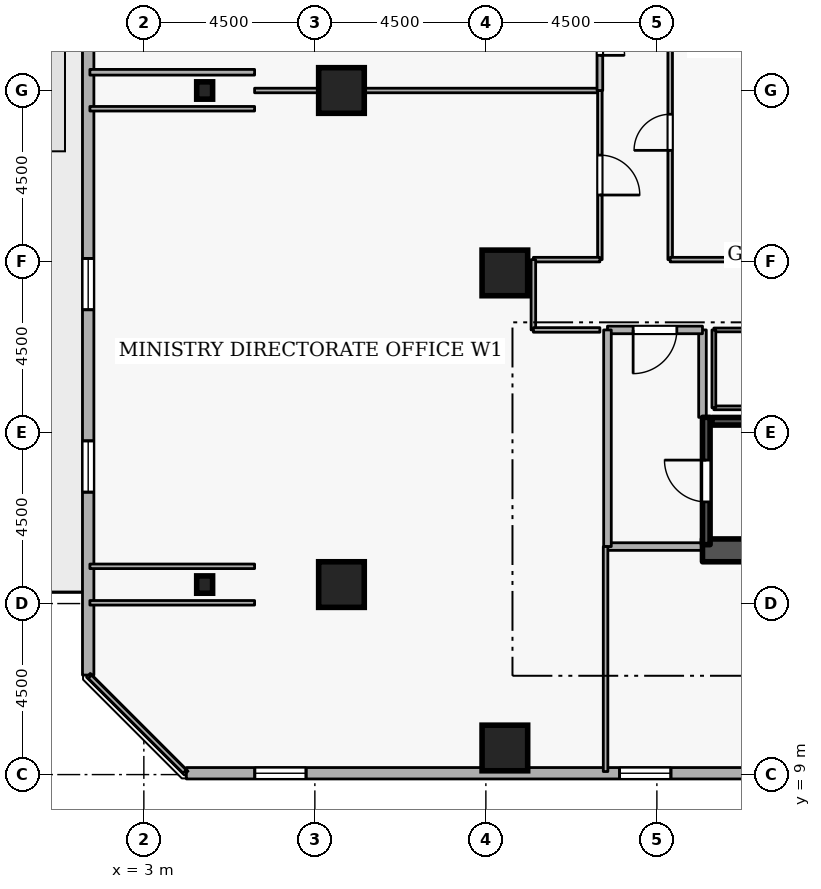
"""IFC4 building model, lengths in metres.
Left out: names, types, materials, properties, quantities, classifications, styles, units other than length and angle.
Written with IfcOpenShell. Run it as: python <this file> out.ifc"""

import sys

from ifc_helpers import new_model, si_unit, direction, frame, frame_2d, origin, origin_2d, place, context, subcontext, project, spatial, rectangle, i_section, extrude, element, fill, save


model = new_model("IFC4")
c1 = context("Model", 3, precision=1e-05, world=origin(), true_north=direction((0.0, 1.0)))
c2 = subcontext(c1, "Body", "Model", "MODEL_VIEW")
j1 = project(units=[si_unit("LENGTHUNIT", "METRE"), si_unit("PLANEANGLEUNIT", "RADIAN")], contexts=[c1])
p1 = place(None, origin())
s1 = spatial("IfcSite", under=j1, at=p1, CompositionType="ELEMENT")
p2 = place(p1, origin())
s2 = spatial("IfcBuilding", under=s1, at=p2, CompositionType="ELEMENT")
p3 = place(p2, frame((0.0, 0.0, 116.1)))
s3 = spatial("IfcBuildingStorey", under=s2, at=p3, CompositionType="ELEMENT", Elevation=116.1)
p4 = place(p3, frame((17.7, 14.9, 0.0), z_axis=(0.0, 0.0, 1.0), x_axis=(1.0, 0.0, 0.0)))
e1 = element("IfcWall", 1, at=p4, inside=s3, PredefinedType="SHEAR", context=c2, shape_type="SweptSolid", body=[
    extrude(rectangle(XDim=15.6, YDim=0.6, at=frame_2d((7.8, 0.0))), origin(), (0.0, 0.0, 1.0), 3.6),
])
for number, where, z_axis, x_axis in (
    (2, (12.5, 9.7, 0.0), (0.0, 0.0, 1.0), (1.0, 0.0, 0.0)),
    (3, (8.2, 14.0, 0.0), (0.0, 0.0, 1.0), (1.0, 0.0, 0.0)),
    (4, (8.2, 27.0, 0.0), (0.0, 0.0, 1.0), (1.0, 0.0, 0.0)),
    (5, (12.5, 22.2, 0.0), (0.0, 0.0, 1.0), (1.0, 0.0, 0.0)),
):
    element("IfcColumn", number, at=place(p3, frame(where, z_axis=z_axis, x_axis=x_axis)), inside=s3, PredefinedType="COLUMN", context=c2, shape_type="SweptSolid", body=[
        extrude(rectangle(XDim=1.2, YDim=1.2, at=origin_2d()), origin(), (0.0, 0.0, 1.0), 3.6),
    ])
for number, where, z_axis, x_axis in (
    (6, (4.6, 14.0, 0.0), (0.0, 0.0, 1.0), (1.0, 0.0, 0.0)),
    (7, (4.6, 27.0, 0.0), (0.0, 0.0, 1.0), (1.0, 0.0, 0.0)),
):
    element("IfcColumn", number, at=place(p3, frame(where, z_axis=z_axis, x_axis=x_axis)), inside=s3, PredefinedType="COLUMN", context=c2, shape_type="SweptSolid", body=[
        extrude(i_section(OverallWidth=0.418, OverallDepth=0.456, WebThickness=0.042, FlangeThickness=0.067, FilletRadius=0.015, at=origin_2d()), origin(), (0.0, 0.0, 1.0), 3.6),
    ])
p5 = place(p3, frame((4.119, 9.035, 0.0), z_axis=(0.0, 0.0, 1.0), x_axis=(1.0, 0.0, 0.0)))
e8 = element("IfcWall", 8, at=p5, inside=s3, PredefinedType="STANDARD", context=c2, shape_type="SweptSolid", body=[
    extrude(rectangle(XDim=36.763, YDim=0.3, at=frame_2d((18.381, 0.0))), origin(), (0.0, 0.0, 1.0), 2.22),
])
p6 = place(p5, frame((1.8, 0.0, 0.72)))
e9 = element("IfcOpeningElement", 9, at=p6, cuts=e8, PredefinedType="OPENING", context=c2, shape_type="SweptSolid", body=[
    extrude(rectangle(XDim=1.35, YDim=1.05, at=frame_2d((0.675, 0.525))), frame((0.0, 0.16, 0.0), z_axis=(0.0, -1.0, 0.0), x_axis=(1.0, 0.0, 0.0)), (0.0, 0.0, 1.0), 0.32),
])
p7 = place(p5, frame((11.4, 0.0, 0.72)))
e10 = element("IfcOpeningElement", 10, at=p7, cuts=e8, PredefinedType="OPENING", context=c2, shape_type="SweptSolid", body=[
    extrude(rectangle(XDim=1.35, YDim=1.05, at=frame_2d((0.675, 0.525))), frame((0.0, 0.16, 0.0), z_axis=(0.0, -1.0, 0.0), x_axis=(1.0, 0.0, 0.0)), (0.0, 0.0, 1.0), 0.32),
])
p8 = place(p5, frame((16.2, 0.0, 0.72)))
e11 = element("IfcOpeningElement", 11, at=p8, cuts=e8, PredefinedType="OPENING", context=c2, shape_type="SweptSolid", body=[
    extrude(rectangle(XDim=1.35, YDim=1.05, at=frame_2d((0.675, 0.525))), frame((0.0, 0.16, 0.0), z_axis=(0.0, -1.0, 0.0), x_axis=(1.0, 0.0, 0.0)), (0.0, 0.0, 1.0), 0.32),
])
p9 = place(p5, frame((25.8, 0.0, 0.72)))
e12 = element("IfcOpeningElement", 12, at=p9, cuts=e8, PredefinedType="OPENING", context=c2, shape_type="SweptSolid", body=[
    extrude(rectangle(XDim=1.35, YDim=1.05, at=frame_2d((0.675, 0.525))), frame((0.0, 0.16, 0.0), z_axis=(0.0, -1.0, 0.0), x_axis=(1.0, 0.0, 0.0)), (0.0, 0.0, 1.0), 0.32),
])
p10 = place(p5, frame((30.6, 0.0, 0.72)))
e13 = element("IfcOpeningElement", 13, at=p10, cuts=e8, PredefinedType="OPENING", context=c2, shape_type="SweptSolid", body=[
    extrude(rectangle(XDim=1.35, YDim=1.05, at=frame_2d((0.675, 0.525))), frame((0.0, 0.16, 0.0), z_axis=(0.0, -1.0, 0.0), x_axis=(1.0, 0.0, 0.0)), (0.0, 0.0, 1.0), 0.32),
])
p11 = place(p3, frame((1.535, 48.381, 0.0), z_axis=(0.0, 0.0, 1.0), x_axis=(0.0, -1.0, 0.0)))
e14 = element("IfcWall", 14, at=p11, inside=s3, PredefinedType="STANDARD", context=c2, shape_type="SweptSolid", body=[
    extrude(rectangle(XDim=36.763, YDim=0.3, at=frame_2d((18.381, 0.0))), origin(), (0.0, 0.0, 1.0), 2.22),
])
p12 = place(p11, frame((19.281, 0.0, 0.0)))
e15 = element("IfcOpeningElement", 15, at=p12, cuts=e14, PredefinedType="OPENING", context=c2, shape_type="SweptSolid", body=[
    extrude(rectangle(XDim=1.0, YDim=2.08, at=frame_2d((0.5, 1.04))), frame((0.0, 0.16, 0.0), z_axis=(0.0, -1.0, 0.0), x_axis=(1.0, 0.0, 0.0)), (0.0, 0.0, 1.0), 0.32),
])
p13 = place(p11, frame((1.8, 0.0, 0.72)))
e16 = element("IfcOpeningElement", 16, at=p13, cuts=e14, PredefinedType="OPENING", context=c2, shape_type="SweptSolid", body=[
    extrude(rectangle(XDim=1.35, YDim=1.05, at=frame_2d((0.675, 0.525))), frame((0.0, 0.16, 0.0), z_axis=(0.0, -1.0, 0.0), x_axis=(1.0, 0.0, 0.0)), (0.0, 0.0, 1.0), 0.32),
])
p14 = place(p11, frame((11.4, 0.0, 0.72)))
e17 = element("IfcOpeningElement", 17, at=p14, cuts=e14, PredefinedType="OPENING", context=c2, shape_type="SweptSolid", body=[
    extrude(rectangle(XDim=1.35, YDim=1.05, at=frame_2d((0.675, 0.525))), frame((0.0, 0.16, 0.0), z_axis=(0.0, -1.0, 0.0), x_axis=(1.0, 0.0, 0.0)), (0.0, 0.0, 1.0), 0.32),
])
p15 = place(p11, frame((16.2, 0.0, 0.72)))
e18 = element("IfcOpeningElement", 18, at=p15, cuts=e14, PredefinedType="OPENING", context=c2, shape_type="SweptSolid", body=[
    extrude(rectangle(XDim=1.35, YDim=1.05, at=frame_2d((0.675, 0.525))), frame((0.0, 0.16, 0.0), z_axis=(0.0, -1.0, 0.0), x_axis=(1.0, 0.0, 0.0)), (0.0, 0.0, 1.0), 0.32),
])
p16 = place(p11, frame((25.8, 0.0, 0.72)))
e19 = element("IfcOpeningElement", 19, at=p16, cuts=e14, PredefinedType="OPENING", context=c2, shape_type="SweptSolid", body=[
    extrude(rectangle(XDim=1.35, YDim=1.05, at=frame_2d((0.675, 0.525))), frame((0.0, 0.16, 0.0), z_axis=(0.0, -1.0, 0.0), x_axis=(1.0, 0.0, 0.0)), (0.0, 0.0, 1.0), 0.32),
])
p17 = place(p11, frame((30.6, 0.0, 0.72)))
e20 = element("IfcOpeningElement", 20, at=p17, cuts=e14, PredefinedType="OPENING", context=c2, shape_type="SweptSolid", body=[
    extrude(rectangle(XDim=1.35, YDim=1.05, at=frame_2d((0.675, 0.525))), frame((0.0, 0.16, 0.0), z_axis=(0.0, -1.0, 0.0), x_axis=(1.0, 0.0, 0.0)), (0.0, 0.0, 1.0), 0.32),
])
p18 = place(p3, frame((17.8, 15.05, 0.0), z_axis=(0.0, 0.0, 1.0), x_axis=(0.0, 1.0, 0.0)))
e21 = element("IfcWall", 21, at=p18, inside=s3, PredefinedType="SHEAR", context=c2, shape_type="SweptSolid", body=[
    extrude(rectangle(XDim=3.35, YDim=0.2, at=frame_2d((1.675, 0.0))), origin(), (0.0, 0.0, 1.0), 3.6),
])
p19 = place(p18, frame((1.125, 0.0, 0.0)))
e22 = element("IfcOpeningElement", 22, at=p19, cuts=e21, PredefinedType="OPENING", context=c2, shape_type="SweptSolid", body=[
    extrude(rectangle(XDim=1.1, YDim=2.1, at=frame_2d((0.55, 1.05))), frame((0.0, 0.11, 0.0), z_axis=(0.0, -1.0, 0.0), x_axis=(1.0, 0.0, 0.0)), (0.0, 0.0, 1.0), 0.22),
])
p20 = place(p3, frame((25.05, 18.297, 0.0), z_axis=(0.0, 0.0, 1.0), x_axis=(-1.0, 0.0, 0.0)))
e23 = element("IfcWall", 23, at=p20, inside=s3, PredefinedType="SHEAR", context=c2, shape_type="SweptSolid", body=[
    extrude(rectangle(XDim=7.1, YDim=0.2, at=frame_2d((3.55, 0.0))), origin(), (0.0, 0.0, 1.0), 3.6),
])
p21 = place(p3, frame((15.2, 15.0, 0.0), z_axis=(0.0, 0.0, 1.0), x_axis=(1.0, 0.0, 0.0)))
e24 = element("IfcWall", 24, at=p21, inside=s3, PredefinedType="STANDARD", context=c2, shape_type="SweptSolid", body=[
    extrude(rectangle(XDim=2.5, YDim=0.2, at=frame_2d((1.25, 0.0))), origin(), (0.0, 0.0, 1.0), 3.32),
])
p22 = place(p3, frame((17.7, 18.4, 0.0), z_axis=(0.0, 0.0, 1.0), x_axis=(0.0, 1.0, 0.0)))
e25 = element("IfcWall", 25, at=p22, inside=s3, PredefinedType="STANDARD", context=c2, shape_type="SweptSolid", body=[
    extrude(rectangle(XDim=2.3, YDim=0.2, at=frame_2d((1.15, 0.0))), origin(), (0.0, 0.0, 1.0), 2.525),
])
p23 = place(p3, frame((17.7, 20.7, 0.0), z_axis=(0.0, 0.0, 1.0), x_axis=(-1.0, 0.0, 0.0)))
e26 = element("IfcWall", 26, at=p23, inside=s3, PredefinedType="STANDARD", context=c2, shape_type="SweptSolid", body=[
    extrude(rectangle(XDim=2.5, YDim=0.2, at=frame_2d((1.25, 0.0))), origin(), (0.0, 0.0, 1.0), 3.32),
])
p24 = place(p23, frame((0.675, 0.0, 0.0)))
e27 = element("IfcOpeningElement", 27, at=p24, cuts=e26, PredefinedType="OPENING", context=c2, shape_type="SweptSolid", body=[
    extrude(rectangle(XDim=1.15, YDim=2.1, at=frame_2d((0.575, 1.05))), frame((0.0, 0.11, 0.0), z_axis=(0.0, -1.0, 0.0), x_axis=(1.0, 0.0, 0.0)), (0.0, 0.0, 1.0), 0.22),
])
p25 = place(p3, frame((15.2, 20.7, 0.0), z_axis=(0.0, 0.0, 1.0), x_axis=(0.0, -1.0, 0.0)))
e28 = element("IfcWall", 28, at=p25, inside=s3, PredefinedType="STANDARD", context=c2, shape_type="SweptSolid", body=[
    extrude(rectangle(XDim=5.7, YDim=0.2, at=frame_2d((2.85, 0.0))), origin(), (0.0, 0.0, 1.0), 3.32),
])
p26 = place(p3, frame((18.0, 18.65, 0.0), z_axis=(0.0, 0.0, 1.0), x_axis=(1.0, 0.0, 0.0)))
e29 = element("IfcWall", 29, at=p26, inside=s3, PredefinedType="PARTITIONING", context=c2, shape_type="SweptSolid", body=[
    extrude(rectangle(XDim=2.6, YDim=0.1, at=frame_2d((1.3, 0.0))), origin(), (0.0, 0.0, 1.0), 3.32),
])
p27 = place(p3, frame((20.6, 20.7, 0.0), z_axis=(0.0, 0.0, 1.0), x_axis=(-1.0, 0.0, 0.0)))
e30 = element("IfcWall", 30, at=p27, inside=s3, PredefinedType="PARTITIONING", context=c2, shape_type="SweptSolid", body=[
    extrude(rectangle(XDim=2.6, YDim=0.1, at=frame_2d((1.3, 0.0))), origin(), (0.0, 0.0, 1.0), 3.32),
])
p28 = place(p27, frame((0.825, 0.0, 0.0)))
e31 = element("IfcOpeningElement", 31, at=p28, cuts=e30, PredefinedType="OPENING", context=c2, shape_type="SweptSolid", body=[
    extrude(rectangle(XDim=0.95, YDim=2.1, at=frame_2d((0.475, 1.05))), frame((0.0, 0.06, 0.0), z_axis=(0.0, -1.0, 0.0), x_axis=(1.0, 0.0, 0.0)), (0.0, 0.0, 1.0), 0.12),
])
p29 = place(p3, frame((18.0, 20.7, 0.0), z_axis=(0.0, 0.0, 1.0), x_axis=(0.0, -1.0, 0.0)))
e32 = element("IfcWall", 32, at=p29, inside=s3, PredefinedType="PARTITIONING", context=c2, shape_type="SweptSolid", body=[
    extrude(rectangle(XDim=2.05, YDim=0.1, at=frame_2d((1.025, 0.0))), origin(), (0.0, 0.0, 1.0), 2.525),
])
for number, where, z_axis, x_axis in (
    (33, (1.58, 13.52, 0.0), (0.0, 0.0, 1.0), (1.0, 0.0, 0.0)),
    (34, (5.914, 14.48, 0.0), (0.0, 0.0, 1.0), (-1.0, 0.0, 0.0)),
    (35, (1.58, 26.52, 0.0), (0.0, 0.0, 1.0), (1.0, 0.0, 0.0)),
):
    element("IfcWall", number, at=place(p3, frame(where, z_axis=z_axis, x_axis=x_axis)), inside=s3, PredefinedType="PARTITIONING", context=c2, shape_type="SweptSolid", body=[
        extrude(rectangle(XDim=4.334, YDim=0.12, at=frame_2d((2.167, 0.0))), origin(), (0.0, 0.0, 1.0), 1.685),
    ])
p30 = place(p3, frame((5.914, 27.0, 0.0), z_axis=(0.0, 0.0, 1.0), x_axis=(1.0, 0.0, 0.0)))
e36 = element("IfcWall", 36, at=p30, inside=s3, PredefinedType="PARTITIONING", context=c2, shape_type="SweptSolid", body=[
    extrude(rectangle(XDim=9.086, YDim=0.12, at=frame_2d((4.543, 0.0))), origin(), (0.0, 0.0, 1.0), 1.685),
])
p31 = place(p3, frame((15.0, 27.0, 0.0), z_axis=(0.0, 0.0, 1.0), x_axis=(0.0, -1.0, 0.0)))
e37 = element("IfcWall", 37, at=p31, inside=s3, PredefinedType="PARTITIONING", context=c2, shape_type="SweptSolid", body=[
    extrude(rectangle(XDim=4.45, YDim=0.12, at=frame_2d((2.225, 0.0))), origin(), (0.0, 0.0, 1.0), 3.32),
])
p32 = place(p31, frame((1.7, 0.0, 0.0)))
e38 = element("IfcOpeningElement", 38, at=p32, cuts=e37, PredefinedType="OPENING", context=c2, shape_type="SweptSolid", body=[
    extrude(rectangle(XDim=1.05, YDim=2.1, at=frame_2d((0.525, 1.05))), frame((0.0, 0.07, 0.0), z_axis=(0.0, -1.0, 0.0), x_axis=(1.0, 0.0, 0.0)), (0.0, 0.0, 1.0), 0.14),
])
p33 = place(p3, frame((15.0, 22.55, 0.0), z_axis=(0.0, 0.0, 1.0), x_axis=(-1.0, 0.0, 0.0)))
e39 = element("IfcWall", 39, at=p33, inside=s3, PredefinedType="PARTITIONING", context=c2, shape_type="SweptSolid", body=[
    extrude(rectangle(XDim=1.75, YDim=0.12, at=frame_2d((0.875, 0.0))), origin(), (0.0, 0.0, 1.0), 3.32),
])
p34 = place(p3, frame((13.25, 22.55, 0.0), z_axis=(0.0, 0.0, 1.0), x_axis=(0.0, -1.0, 0.0)))
e40 = element("IfcWall", 40, at=p34, inside=s3, PredefinedType="PARTITIONING", context=c2, shape_type="SweptSolid", body=[
    extrude(rectangle(XDim=1.85, YDim=0.12, at=frame_2d((0.925, 0.0))), origin(), (0.0, 0.0, 1.0), 3.32),
])
p35 = place(p3, frame((13.25, 20.7, 0.0), z_axis=(0.0, 0.0, 1.0), x_axis=(1.0, 0.0, 0.0)))
e41 = element("IfcWall", 41, at=p35, inside=s3, PredefinedType="PARTITIONING", context=c2, shape_type="SweptSolid", body=[
    extrude(rectangle(XDim=1.75, YDim=0.12, at=frame_2d((0.875, 0.0))), origin(), (0.0, 0.0, 1.0), 3.32),
])
p36 = place(p3, frame((15.15, 15.0, 0.0), z_axis=(0.0, 0.0, 1.0), x_axis=(0.0, -1.0, 0.0)))
e42 = element("IfcWall", 42, at=p36, inside=s3, PredefinedType="PARTITIONING", context=c2, shape_type="SweptSolid", body=[
    extrude(rectangle(XDim=5.92, YDim=0.12, at=frame_2d((2.96, 0.0))), origin(), (0.0, 0.0, 1.0), 3.32),
])
p37 = place(p3, frame((4.075, 9.08, 0.0), z_axis=(0.0, 0.0, 1.0), x_axis=(-0.707106781187, 0.707106781187, 0.0)))
e43 = element("IfcWall", 43, at=p37, inside=s3, PredefinedType="PARTITIONING", context=c2, shape_type="SweptSolid", body=[
    extrude(rectangle(XDim=3.528, YDim=0.12, at=frame_2d((1.764, 0.0))), origin(), (0.0, 0.0, 1.0), 3.32),
])
p38 = place(p3, frame((15.0, 30.15, 0.0), z_axis=(0.0, 0.0, 1.0), x_axis=(0.0, -1.0, 0.0)))
e44 = element("IfcWall", 44, at=p38, inside=s3, PredefinedType="PARTITIONING", context=c2, shape_type="SweptSolid", body=[
    extrude(rectangle(XDim=3.15, YDim=0.15, at=frame_2d((1.575, 0.0))), origin(), (0.0, 0.0, 1.0), 3.32),
])
p39 = place(p38, frame((0.925, 0.0, 0.0)))
e45 = element("IfcOpeningElement", 45, at=p39, cuts=e44, PredefinedType="OPENING", context=c2, shape_type="SweptSolid", body=[
    extrude(rectangle(XDim=1.3, YDim=2.12, at=frame_2d((0.65, 1.06))), frame((0.0, 0.085, 0.0), z_axis=(0.0, -1.0, 0.0), x_axis=(1.0, 0.0, 0.0)), (0.0, 0.0, 1.0), 0.17),
])
p40 = place(p3, frame((5.914, 27.48, 0.0), z_axis=(0.0, 0.0, 1.0), x_axis=(-1.0, 0.0, 0.0)))
e46 = element("IfcWall", 46, at=p40, inside=s3, PredefinedType="PARTITIONING", context=c2, shape_type="SweptSolid", body=[
    extrude(rectangle(XDim=4.334, YDim=0.15, at=frame_2d((2.167, 0.0))), origin(), (0.0, 0.0, 1.0), 1.685),
])
p41 = place(p3, frame((16.85, 22.55, 0.0), z_axis=(0.0, 0.0, 1.0), x_axis=(0.0, 1.0, 0.0)))
e47 = element("IfcWall", 47, at=p41, inside=s3, PredefinedType="PARTITIONING", context=c2, shape_type="SweptSolid", body=[
    extrude(rectangle(XDim=8.9, YDim=0.12, at=frame_2d((4.45, 0.0))), origin(), (0.0, 0.0, 1.0), 3.32),
])
p42 = place(p41, frame((2.875, 0.0, 0.0)))
e48 = element("IfcOpeningElement", 48, at=p42, cuts=e47, PredefinedType="OPENING", context=c2, shape_type="SweptSolid", body=[
    extrude(rectangle(XDim=0.95, YDim=2.1, at=frame_2d((0.475, 1.05))), frame((0.0, 0.07, 0.0), z_axis=(0.0, -1.0, 0.0), x_axis=(1.0, 0.0, 0.0)), (0.0, 0.0, 1.0), 0.14),
])
p43 = place(p3, frame((20.3, 22.55, 0.0), z_axis=(0.0, 0.0, 1.0), x_axis=(-1.0, 0.0, 0.0)))
e49 = element("IfcWall", 49, at=p43, inside=s3, PredefinedType="PARTITIONING", context=c2, shape_type="SweptSolid", body=[
    extrude(rectangle(XDim=3.45, YDim=0.12, at=frame_2d((1.725, 0.0))), origin(), (0.0, 0.0, 1.0), 3.32),
])
p44 = place(p6, origin())
e50 = element("IfcWindow", 50, at=p44, inside=s3, PartitioningType="SINGLE_PANEL", PredefinedType="WINDOW", context=c2, shape_type="SweptSolid", body=[
    extrude(rectangle(XDim=1.35, YDim=1.05, at=frame_2d((0.675, 0.525))), frame((0.0, 0.03, 0.0), z_axis=(0.0, -1.0, 0.0), x_axis=(1.0, 0.0, 0.0)), (0.0, 0.0, 1.0), 0.06),
])
fill(e9, e50)
p45 = place(p7, origin())
e51 = element("IfcWindow", 51, at=p45, inside=s3, PartitioningType="SINGLE_PANEL", PredefinedType="WINDOW", context=c2, shape_type="SweptSolid", body=[
    extrude(rectangle(XDim=1.35, YDim=1.05, at=frame_2d((0.675, 0.525))), frame((0.0, 0.03, 0.0), z_axis=(0.0, -1.0, 0.0), x_axis=(1.0, 0.0, 0.0)), (0.0, 0.0, 1.0), 0.06),
])
fill(e10, e51)
p46 = place(p16, origin())
e52 = element("IfcWindow", 52, at=p46, inside=s3, PartitioningType="SINGLE_PANEL", PredefinedType="WINDOW", context=c2, shape_type="SweptSolid", body=[
    extrude(rectangle(XDim=1.35, YDim=1.05, at=frame_2d((0.675, 0.525))), frame((0.0, 0.03, 0.0), z_axis=(0.0, -1.0, 0.0), x_axis=(1.0, 0.0, 0.0)), (0.0, 0.0, 1.0), 0.06),
])
fill(e19, e52)
p47 = place(p17, origin())
e53 = element("IfcWindow", 53, at=p47, inside=s3, PartitioningType="SINGLE_PANEL", PredefinedType="WINDOW", context=c2, shape_type="SweptSolid", body=[
    extrude(rectangle(XDim=1.35, YDim=1.05, at=frame_2d((0.675, 0.525))), frame((0.0, 0.03, 0.0), z_axis=(0.0, -1.0, 0.0), x_axis=(1.0, 0.0, 0.0)), (0.0, 0.0, 1.0), 0.06),
])
fill(e20, e53)
p48 = place(p19, origin())
e54 = element("IfcDoor", 54, at=p48, inside=s3, OperationType="SINGLE_SWING_RIGHT", PredefinedType="DOOR", context=c2, shape_type="SweptSolid", body=[
    extrude(rectangle(XDim=1.1, YDim=2.1, at=frame_2d((0.55, 1.05))), frame((0.0, 0.025, 0.0), z_axis=(0.0, -1.0, 0.0), x_axis=(1.0, 0.0, 0.0)), (0.0, 0.0, 1.0), 0.05),
])
fill(e22, e54)
p49 = place(p24, origin())
e55 = element("IfcDoor", 55, at=p49, inside=s3, OperationType="SINGLE_SWING_RIGHT", PredefinedType="DOOR", context=c2, shape_type="SweptSolid", body=[
    extrude(rectangle(XDim=1.15, YDim=2.1, at=frame_2d((0.575, 1.05))), frame((0.0, 0.025, 0.0), z_axis=(0.0, -1.0, 0.0), x_axis=(1.0, 0.0, 0.0)), (0.0, 0.0, 1.0), 0.05),
])
fill(e27, e55)
p50 = place(p32, origin())
e56 = element("IfcDoor", 56, at=p50, inside=s3, OperationType="SINGLE_SWING_RIGHT", PredefinedType="DOOR", context=c2, shape_type="SweptSolid", body=[
    extrude(rectangle(XDim=1.05, YDim=2.1, at=frame_2d((0.525, 1.05))), frame((0.0, 0.025, 0.0), z_axis=(0.0, -1.0, 0.0), x_axis=(1.0, 0.0, 0.0)), (0.0, 0.0, 1.0), 0.05),
])
fill(e38, e56)
p51 = place(p39, origin())
e57 = element("IfcDoor", 57, at=p51, inside=s3, OperationType="DOUBLE_DOOR_SINGLE_SWING", PredefinedType="DOOR", context=c2, shape_type="SweptSolid", body=[
    extrude(rectangle(XDim=1.3, YDim=2.12, at=frame_2d((0.65, 1.06))), frame((0.0, 0.025, 0.0), z_axis=(0.0, -1.0, 0.0), x_axis=(1.0, 0.0, 0.0)), (0.0, 0.0, 1.0), 0.05),
])
fill(e45, e57)
p52 = place(p42, origin())
e58 = element("IfcDoor", 58, at=p52, inside=s3, OperationType="SINGLE_SWING_LEFT", PredefinedType="DOOR", context=c2, shape_type="SweptSolid", body=[
    extrude(rectangle(XDim=0.95, YDim=2.1, at=frame_2d((0.475, 1.05))), frame((0.0, 0.025, 0.0), z_axis=(0.0, -1.0, 0.0), x_axis=(1.0, 0.0, 0.0)), (0.0, 0.0, 1.0), 0.05),
])
fill(e48, e58)
save(model, sys.argv[1])
